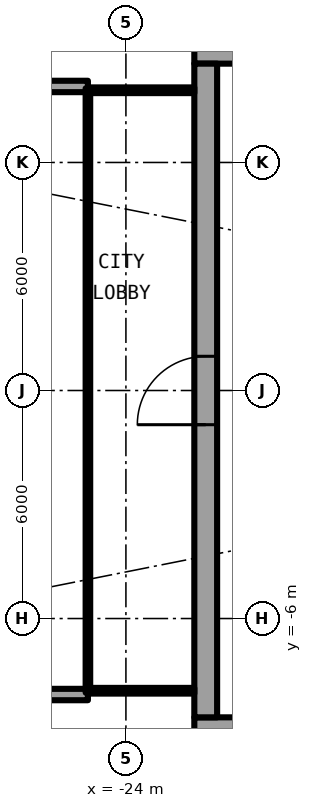
"""IFC4 building model, lengths in metres.
Left out: names, types, materials, properties, quantities, classifications, styles, units other than length and angle.
Written with IfcOpenShell. Run it as: python <this file> out.ifc"""

import sys

from ifc_helpers import new_model, si_unit, direction, frame, frame_2d, origin, place, context, subcontext, project, spatial, rectangle, extrude, element, fill, save


model = new_model("IFC4")
c1 = context("Model", 3, precision=1e-05, world=origin(), true_north=direction((0.0, 1.0)))
c2 = subcontext(c1, "Body", "Model", "MODEL_VIEW")
j1 = project(units=[si_unit("LENGTHUNIT", "METRE"), si_unit("PLANEANGLEUNIT", "RADIAN")], contexts=[c1])
p1 = place(None, origin())
s1 = spatial("IfcSite", under=j1, at=p1, CompositionType="ELEMENT")
p2 = place(p1, origin())
s2 = spatial("IfcBuilding", under=s1, at=p2, CompositionType="ELEMENT")
p3 = place(p2, frame((0.0, 0.0, 111.65)))
s3 = spatial("IfcBuildingStorey", under=s2, at=p3, CompositionType="ELEMENT", Elevation=111.65)
for number, where, z_axis, x_axis in (
    (1, (-25.0, 8.0, 0.0), (0.0, 0.0, 1.0), (-1.0, 0.0, 0.0)),
    (2, (-25.0, -8.0, 0.0), (0.0, 0.0, 1.0), (-1.0, 0.0, 0.0)),
):
    element("IfcWall", number, at=place(p3, frame(where, z_axis=z_axis, x_axis=x_axis)), inside=s3, PredefinedType="SOLIDWALL", context=c2, shape_type="SweptSolid", body=[
        extrude(rectangle(XDim=2.667, YDim=0.3, at=frame_2d((1.333, 0.0))), origin(), (0.0, 0.0, 1.0), 2.7),
    ])
p4 = place(p3, frame((-22.2, -8.9, 0.0), z_axis=(0.0, 0.0, 1.0), x_axis=(1.0, 0.0, 0.0)))
e3 = element("IfcWall", 3, at=p4, inside=s3, PredefinedType="SHEAR", context=c2, shape_type="SweptSolid", body=[
    extrude(rectangle(XDim=13.8, YDim=0.6, at=frame_2d((6.9, 0.0))), origin(), (0.0, 0.0, 1.0), 3.05),
])
p5 = place(p4, frame((1.125, 0.0, 0.0)))
e4 = element("IfcOpeningElement", 4, at=p5, cuts=e3, PredefinedType="OPENING", context=c2, shape_type="SweptSolid", body=[
    extrude(rectangle(XDim=1.2, YDim=2.3, at=frame_2d((0.6, 1.15))), frame((0.0, 0.31, 0.0), z_axis=(0.0, -1.0, 0.0), x_axis=(1.0, 0.0, 0.0)), (0.0, 0.0, 1.0), 0.62),
])
p6 = place(p3, frame((-8.4, 8.9, 0.0), z_axis=(0.0, 0.0, 1.0), x_axis=(-1.0, 0.0, 0.0)))
e5 = element("IfcWall", 5, at=p6, inside=s3, PredefinedType="SHEAR", context=c2, shape_type="SweptSolid", body=[
    extrude(rectangle(XDim=13.8, YDim=0.6, at=frame_2d((6.9, 0.0))), origin(), (0.0, 0.0, 1.0), 3.05),
])
p7 = place(p6, frame((11.475, 0.0, 0.0)))
e6 = element("IfcOpeningElement", 6, at=p7, cuts=e5, PredefinedType="OPENING", context=c2, shape_type="SweptSolid", body=[
    extrude(rectangle(XDim=1.2, YDim=2.3, at=frame_2d((0.6, 1.15))), frame((0.0, 0.31, 0.0), z_axis=(0.0, -1.0, 0.0), x_axis=(1.0, 0.0, 0.0)), (0.0, 0.0, 1.0), 0.62),
])
p8 = place(p3, frame((-21.9, -8.6, 0.0), z_axis=(0.0, 0.0, 1.0), x_axis=(0.0, 1.0, 0.0)))
e7 = element("IfcWall", 7, at=p8, inside=s3, PredefinedType="SHEAR", context=c2, shape_type="SweptSolid", body=[
    extrude(rectangle(XDim=17.2, YDim=0.6, at=frame_2d((8.6, 0.0))), origin(), (0.0, 0.0, 1.0), 3.05),
])
p9 = place(p8, frame((7.7, 0.0, 0.0)))
e8 = element("IfcOpeningElement", 8, at=p9, cuts=e7, PredefinedType="OPENING", context=c2, shape_type="SweptSolid", body=[
    extrude(rectangle(XDim=1.8, YDim=2.3, at=frame_2d((0.9, 1.15))), frame((0.0, 0.31, 0.0), z_axis=(0.0, -1.0, 0.0), x_axis=(1.0, 0.0, 0.0)), (0.0, 0.0, 1.0), 0.62),
])
for number, where, z_axis, x_axis in (
    (9, (-22.2, 7.9, 0.0), (0.0, 0.0, 1.0), (-1.0, 0.0, 0.0)),
    (10, (-22.2, -7.9, 0.0), (0.0, 0.0, 1.0), (-1.0, 0.0, 0.0)),
):
    element("IfcWall", number, at=place(p3, frame(where, z_axis=z_axis, x_axis=x_axis)), inside=s3, PredefinedType="PARTITIONING", context=c2, shape_type="SweptSolid", body=[
        extrude(rectangle(XDim=2.74, YDim=0.15, at=frame_2d((1.37, 0.0))), origin(), (0.0, 0.0, 1.0), 2.7),
    ])
p10 = place(p3, frame((-25.0, 7.95, 0.0), z_axis=(0.0, 0.0, 1.0), x_axis=(0.0, -1.0, 0.0)))
e11 = element("IfcWall", 11, at=p10, inside=s3, PredefinedType="PARTITIONING", context=c2, shape_type="SweptSolid", body=[
    extrude(rectangle(XDim=15.9, YDim=0.12, at=frame_2d((7.95, 0.0))), origin(), (0.0, 0.0, 1.0), 2.7),
])
p11 = place(p10, frame((0.95, 0.0, 0.1)))
e12 = element("IfcOpeningElement", 12, at=p11, cuts=e11, PredefinedType="OPENING", context=c2, shape_type="SweptSolid", body=[
    extrude(rectangle(XDim=14.0, YDim=2.35, at=frame_2d((7.0, 1.175))), frame((0.0, 0.07, 0.0), z_axis=(0.0, -1.0, 0.0), x_axis=(1.0, 0.0, 0.0)), (0.0, 0.0, 1.0), 0.14),
])
p12 = place(p9, origin())
e13 = element("IfcDoor", 13, at=p12, inside=s3, OperationType="SINGLE_SWING_LEFT", PredefinedType="DOOR", context=c2, shape_type="SweptSolid", body=[
    extrude(rectangle(XDim=1.8, YDim=2.3, at=frame_2d((0.9, 1.15))), frame((0.0, 0.025, 0.0), z_axis=(0.0, -1.0, 0.0), x_axis=(1.0, 0.0, 0.0)), (0.0, 0.0, 1.0), 0.05),
])
fill(e8, e13)
p13 = place(p11, origin())
e14 = element("IfcWindow", 14, at=p13, inside=s3, PartitioningType="SINGLE_PANEL", PredefinedType="WINDOW", context=c2, shape_type="SweptSolid", body=[
    extrude(rectangle(XDim=14.0, YDim=2.35, at=frame_2d((7.0, 1.175))), frame((0.0, 0.03, 0.0), z_axis=(0.0, -1.0, 0.0), x_axis=(1.0, 0.0, 0.0)), (0.0, 0.0, 1.0), 0.06),
])
fill(e12, e14)
save(model, sys.argv[1])
